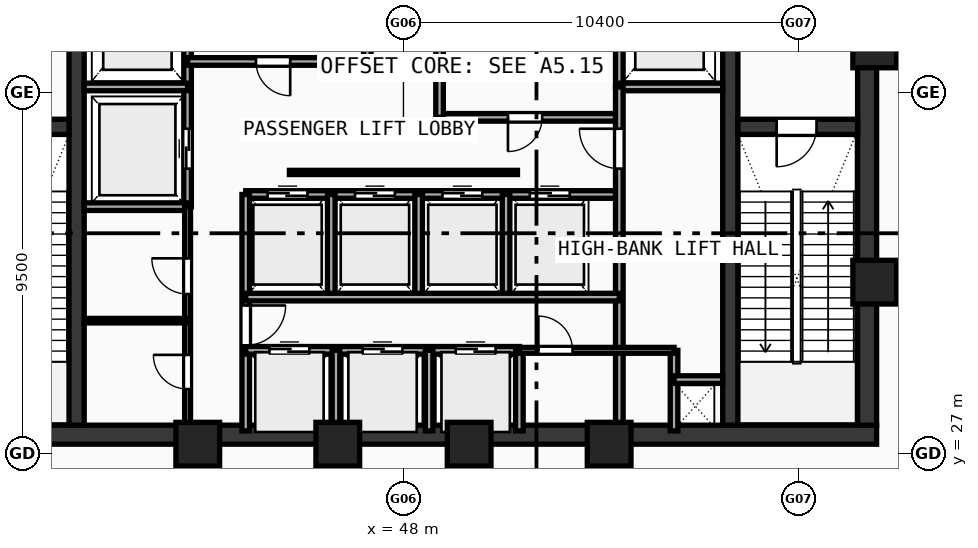
"""IFC4 building model, lengths in metres.
Left out: names, types, materials, properties, quantities, classifications, styles, units other than length and angle.
Written with IfcOpenShell. Run it as: python <this file> out.ifc"""

import sys

from ifc_helpers import new_model, si_unit, direction, frame, frame_2d, origin, origin_with_axes, origin_2d, place, context, subcontext, project, spatial, rectangle, hollow_rectangle, extrude, source, transform, mapped, element, fill, save


model = new_model("IFC4")
c1 = context("Model", 3, precision=1e-05, world=origin(), true_north=direction((0.0, 1.0)))
c2 = subcontext(c1, "Body", "Model", "MODEL_VIEW")
j1 = project(units=[si_unit("LENGTHUNIT", "METRE"), si_unit("PLANEANGLEUNIT", "RADIAN")], contexts=[c1])
p1 = place(None, origin())
s1 = spatial("IfcSite", under=j1, at=p1, CompositionType="ELEMENT")
p2 = place(p1, origin())
s2 = spatial("IfcBuilding", under=s1, at=p2, CompositionType="ELEMENT")
p3 = place(p2, frame((0.0, 0.0, 218.96)))
s3 = spatial("IfcBuildingStorey", under=s2, at=p3, CompositionType="ELEMENT", Elevation=218.96)
p4 = place(p3, frame((35.55, 27.5, 0.0), z_axis=(0.0, 0.0, 1.0), x_axis=(1.0, 0.0, 0.0)))
e1 = element("IfcWall", 1, at=p4, inside=s3, PredefinedType="SHEAR", context=c2, shape_type="SweptSolid", body=[
    extrude(rectangle(XDim=24.9, YDim=0.5, at=frame_2d((12.45, 0.0))), origin(), (0.0, 0.0, 1.0), 5.57),
])
p5 = place(p3, frame((60.2, 27.75, 0.0), z_axis=(0.0, 0.0, 1.0), x_axis=(0.0, 1.0, 0.0)))
e2 = element("IfcWall", 2, at=p5, inside=s3, PredefinedType="SHEAR", context=c2, shape_type="SweptSolid", body=[
    extrude(rectangle(XDim=12.2, YDim=0.5, at=frame_2d((6.1, 0.0))), origin(), (0.0, 0.0, 1.0), 5.57),
])
p6 = place(p3, frame((39.4, 27.75, 0.0), z_axis=(0.0, 0.0, 1.0), x_axis=(0.0, 1.0, 0.0)))
e3 = element("IfcWall", 3, at=p6, inside=s3, PredefinedType="SHEAR", context=c2, shape_type="SweptSolid", body=[
    extrude(rectangle(XDim=12.2, YDim=0.4, at=frame_2d((6.1, 0.0))), origin(), (0.0, 0.0, 1.0), 5.57),
])
p7 = place(p6, frame((10.0, 0.0, 0.0)))
e4 = element("IfcOpeningElement", 4, at=p7, cuts=e3, PredefinedType="OPENING", context=c2, shape_type="SweptSolid", body=[
    extrude(rectangle(XDim=1.1, YDim=2.1, at=frame_2d((0.55, 1.05))), frame((0.0, 0.21, 0.0), z_axis=(0.0, -1.0, 0.0), x_axis=(1.0, 0.0, 0.0)), (0.0, 0.0, 1.0), 0.42),
])
p8 = place(p3, frame((56.6, 27.75, 0.0), z_axis=(0.0, 0.0, 1.0), x_axis=(0.0, 1.0, 0.0)))
e5 = element("IfcWall", 5, at=p8, inside=s3, PredefinedType="SHEAR", context=c2, shape_type="SweptSolid", body=[
    extrude(rectangle(XDim=12.2, YDim=0.4, at=frame_2d((6.1, 0.0))), origin(), (0.0, 0.0, 1.0), 5.57),
])
p9 = place(p8, frame((10.0, 0.0, 0.0)))
e6 = element("IfcOpeningElement", 6, at=p9, cuts=e5, PredefinedType="OPENING", context=c2, shape_type="SweptSolid", body=[
    extrude(rectangle(XDim=1.1, YDim=2.1, at=frame_2d((0.55, 1.05))), frame((0.0, 0.21, 0.0), z_axis=(0.0, -1.0, 0.0), x_axis=(1.0, 0.0, 0.0)), (0.0, 0.0, 1.0), 0.42),
])
p10 = place(p3, frame((36.05, 35.6, 0.0), z_axis=(0.0, 0.0, 1.0), x_axis=(1.0, 0.0, 0.0)))
e7 = element("IfcWall", 7, at=p10, inside=s3, PredefinedType="SHEAR", context=c2, shape_type="SweptSolid", body=[
    extrude(rectangle(XDim=3.15, YDim=0.4, at=frame_2d((1.575, 0.0))), origin(), (0.0, 0.0, 1.0), 5.57),
])
p11 = place(p10, frame((1.07, 0.0, 0.0)))
e8 = element("IfcOpeningElement", 8, at=p11, cuts=e7, PredefinedType="OPENING", context=c2, shape_type="SweptSolid", body=[
    extrude(rectangle(XDim=1.05, YDim=2.1, at=frame_2d((0.525, 1.05))), frame((0.0, 0.21, 0.0), z_axis=(0.0, -1.0, 0.0), x_axis=(1.0, 0.0, 0.0)), (0.0, 0.0, 1.0), 0.42),
])
p12 = place(p3, frame((56.8, 35.6, 0.0), z_axis=(0.0, 0.0, 1.0), x_axis=(1.0, 0.0, 0.0)))
e9 = element("IfcWall", 9, at=p12, inside=s3, PredefinedType="SHEAR", context=c2, shape_type="SweptSolid", body=[
    extrude(rectangle(XDim=3.15, YDim=0.4, at=frame_2d((1.575, 0.0))), origin(), (0.0, 0.0, 1.0), 5.57),
])
p13 = place(p12, frame((1.02, 0.0, 0.0)))
e10 = element("IfcOpeningElement", 10, at=p13, cuts=e9, PredefinedType="OPENING", context=c2, shape_type="SweptSolid", body=[
    extrude(rectangle(XDim=1.05, YDim=2.1, at=frame_2d((0.525, 1.05))), frame((0.0, 0.21, 0.0), z_axis=(0.0, -1.0, 0.0), x_axis=(1.0, 0.0, 0.0)), (0.0, 0.0, 1.0), 0.42),
])
m1 = source(origin(), c2, "Body", "SweptSolid", [
    extrude(hollow_rectangle(XDim=1.15, YDim=1.15, WallThickness=0.048, at=origin_2d()), origin(), (0.0, 0.0, 1.0), 5.85),
])
for number, where, z_axis, x_axis in (
    (11, (42.588, 27.25, -0.28), (0.0, 0.0, 1.0), (1.0, 0.0, 0.0)),
    (12, (46.272, 27.25, -0.28), (0.0, 0.0, 1.0), (1.0, 0.0, 0.0)),
    (13, (49.729, 27.25, -0.28), (0.0, 0.0, 1.0), (1.0, 0.0, 0.0)),
    (14, (53.412, 27.25, -0.28), (0.0, 0.0, 1.0), (1.0, 0.0, 0.0)),
    (15, (60.4, 31.513, -0.28), (0.0, 0.0, 1.0), (1.0, 0.0, 0.0)),
    (16, (60.4, 37.729, -0.28), (0.0, 0.0, 1.0), (1.0, 0.0, 0.0)),
):
    element("IfcColumn", number, at=place(p3, frame(where, z_axis=z_axis, x_axis=x_axis)), inside=s3, PredefinedType="COLUMN", context=c2, shape_type="MappedRepresentation", body=[
        mapped(m1, transform((0.0, 0.0, 0.0), scale=1.0)),
    ])
p14 = place(p3, frame((42.32, 33.5, 0.0), z_axis=(0.0, 0.0, 1.0), x_axis=(0.0, 1.0, 0.0)))
e17 = element("IfcWall", 17, at=p14, inside=s3, PredefinedType="SOLIDWALL", context=c2, shape_type="SweptSolid", body=[
    extrude(rectangle(XDim=6.45, YDim=0.2, at=frame_2d((3.225, 0.0))), origin(), (0.0, 0.0, 1.0), 5.57),
])
p15 = place(p14, frame((1.0, 0.0, 0.0)))
e18 = element("IfcOpeningElement", 18, at=p15, cuts=e17, PredefinedType="OPENING", context=c2, shape_type="SweptSolid", body=[
    extrude(rectangle(XDim=1.05, YDim=2.1, at=frame_2d((0.525, 1.05))), frame((0.0, 0.11, 0.0), z_axis=(0.0, -1.0, 0.0), x_axis=(1.0, 0.0, 0.0)), (0.0, 0.0, 1.0), 0.22),
])
for number, where, z_axis, x_axis in (
    (19, (39.6, 36.65, 0.0), (0.0, 0.0, 1.0), (1.0, 0.0, 0.0)),
    (20, (39.6, 33.5, 0.0), (0.0, 0.0, 1.0), (1.0, 0.0, 0.0)),
):
    element("IfcWall", number, at=place(p3, frame(where, z_axis=z_axis, x_axis=x_axis)), inside=s3, PredefinedType="SOLIDWALL", context=c2, shape_type="SweptSolid", body=[
        extrude(rectangle(XDim=2.72, YDim=0.2, at=frame_2d((1.36, 0.0))), origin(), (0.0, 0.0, 1.0), 5.57),
    ])
p16 = place(p3, frame((53.68, 36.65, 0.0), z_axis=(0.0, 0.0, 1.0), x_axis=(0.0, 1.0, 0.0)))
e21 = element("IfcWall", 21, at=p16, inside=s3, PredefinedType="SOLIDWALL", context=c2, shape_type="SweptSolid", body=[
    extrude(rectangle(XDim=3.3, YDim=0.2, at=frame_2d((1.65, 0.0))), origin(), (0.0, 0.0, 1.0), 5.57),
])
p17 = place(p3, frame((53.68, 36.65, 0.0), z_axis=(0.0, 0.0, 1.0), x_axis=(1.0, 0.0, 0.0)))
e22 = element("IfcWall", 22, at=p17, inside=s3, PredefinedType="SOLIDWALL", context=c2, shape_type="SweptSolid", body=[
    extrude(rectangle(XDim=2.72, YDim=0.2, at=frame_2d((1.36, 0.0))), origin(), (0.0, 0.0, 1.0), 5.57),
])
p18 = place(p3, frame((42.32, 37.32, 0.0), z_axis=(0.0, 0.0, 1.0), x_axis=(1.0, 0.0, 0.0)))
e23 = element("IfcWall", 23, at=p18, inside=s3, PredefinedType="SOLIDWALL", context=c2, shape_type="SweptSolid", body=[
    extrude(rectangle(XDim=4.73, YDim=0.2, at=frame_2d((2.365, 0.0))), origin(), (0.0, 0.0, 1.0), 5.57),
])
p19 = place(p18, frame((1.8, 0.0, 0.0)))
e24 = element("IfcOpeningElement", 24, at=p19, cuts=e23, PredefinedType="OPENING", context=c2, shape_type="SweptSolid", body=[
    extrude(rectangle(XDim=0.9, YDim=2.1, at=frame_2d((0.45, 1.05))), frame((0.0, 0.11, 0.0), z_axis=(0.0, -1.0, 0.0), x_axis=(1.0, 0.0, 0.0)), (0.0, 0.0, 1.0), 0.22),
])
p20 = place(p3, frame((48.95, 35.85, 0.0), z_axis=(0.0, 0.0, 1.0), x_axis=(1.0, 0.0, 0.0)))
e25 = element("IfcWall", 25, at=p20, inside=s3, PredefinedType="SOLIDWALL", context=c2, shape_type="SweptSolid", body=[
    extrude(rectangle(XDim=4.73, YDim=0.2, at=frame_2d((2.365, 0.0))), origin(), (0.0, 0.0, 1.0), 5.57),
])
p21 = place(p20, frame((1.8, 0.0, 0.0)))
e26 = element("IfcOpeningElement", 26, at=p21, cuts=e25, PredefinedType="OPENING", context=c2, shape_type="SweptSolid", body=[
    extrude(rectangle(XDim=0.9, YDim=2.1, at=frame_2d((0.45, 1.05))), frame((0.0, 0.11, 0.0), z_axis=(0.0, -1.0, 0.0), x_axis=(1.0, 0.0, 0.0)), (0.0, 0.0, 1.0), 0.22),
])
p22 = place(p3, frame((47.05, 37.32, 0.0), z_axis=(0.0, 0.0, 1.0), x_axis=(0.0, 1.0, 0.0)))
e27 = element("IfcWall", 27, at=p22, inside=s3, PredefinedType="SOLIDWALL", context=c2, shape_type="SweptSolid", body=[
    extrude(rectangle(XDim=2.63, YDim=0.2, at=frame_2d((1.315, 0.0))), origin(), (0.0, 0.0, 1.0), 5.57),
])
p23 = place(p3, frame((48.95, 35.85, 0.0), z_axis=(0.0, 0.0, 1.0), x_axis=(0.0, 1.0, 0.0)))
e28 = element("IfcWall", 28, at=p23, inside=s3, PredefinedType="SOLIDWALL", context=c2, shape_type="SweptSolid", body=[
    extrude(rectangle(XDim=4.1, YDim=0.2, at=frame_2d((2.05, 0.0))), origin(), (0.0, 0.0, 1.0), 5.57),
])
p24 = place(p3, frame((43.85, 33.82, 0.0), z_axis=(0.0, 0.0, 1.0), x_axis=(1.0, 0.0, 0.0)))
e29 = element("IfcWall", 29, at=p24, inside=s3, PredefinedType="SOLIDWALL", context=c2, shape_type="SweptSolid", body=[
    extrude(rectangle(XDim=9.83, YDim=0.2, at=frame_2d((4.915, 0.0))), origin(), (0.0, 0.0, 1.0), 5.57),
])
p25 = place(p24, frame((0.575, 0.0, 0.0)))
e30 = element("IfcOpeningElement", 30, at=p25, cuts=e29, PredefinedType="OPENING", context=c2, shape_type="SweptSolid", body=[
    extrude(rectangle(XDim=1.05, YDim=2.1, at=frame_2d((0.525, 1.05))), frame((0.0, 0.11, 0.0), z_axis=(0.0, -1.0, 0.0), x_axis=(1.0, 0.0, 0.0)), (0.0, 0.0, 1.0), 0.22),
])
p26 = place(p24, frame((2.875, 0.0, 0.0)))
e31 = element("IfcOpeningElement", 31, at=p26, cuts=e29, PredefinedType="OPENING", context=c2, shape_type="SweptSolid", body=[
    extrude(rectangle(XDim=1.05, YDim=2.1, at=frame_2d((0.525, 1.05))), frame((0.0, 0.11, 0.0), z_axis=(0.0, -1.0, 0.0), x_axis=(1.0, 0.0, 0.0)), (0.0, 0.0, 1.0), 0.22),
])
p27 = place(p24, frame((5.175, 0.0, 0.0)))
e32 = element("IfcOpeningElement", 32, at=p27, cuts=e29, PredefinedType="OPENING", context=c2, shape_type="SweptSolid", body=[
    extrude(rectangle(XDim=1.05, YDim=2.1, at=frame_2d((0.525, 1.05))), frame((0.0, 0.11, 0.0), z_axis=(0.0, -1.0, 0.0), x_axis=(1.0, 0.0, 0.0)), (0.0, 0.0, 1.0), 0.22),
])
p28 = place(p24, frame((7.475, 0.0, 0.0)))
e33 = element("IfcOpeningElement", 33, at=p28, cuts=e29, PredefinedType="OPENING", context=c2, shape_type="SweptSolid", body=[
    extrude(rectangle(XDim=1.05, YDim=2.1, at=frame_2d((0.525, 1.05))), frame((0.0, 0.11, 0.0), z_axis=(0.0, -1.0, 0.0), x_axis=(1.0, 0.0, 0.0)), (0.0, 0.0, 1.0), 0.22),
])
p29 = place(p3, frame((43.85, 27.6, 0.0), z_axis=(0.0, 0.0, 1.0), x_axis=(0.0, 1.0, 0.0)))
e34 = element("IfcWall", 34, at=p29, inside=s3, PredefinedType="SOLIDWALL", context=c2, shape_type="SweptSolid", body=[
    extrude(rectangle(XDim=6.22, YDim=0.2, at=frame_2d((3.11, 0.0))), origin(), (0.0, 0.0, 1.0), 5.57),
])
p30 = place(p29, frame((2.25, 0.0, 0.0)))
e35 = element("IfcOpeningElement", 35, at=p30, cuts=e34, PredefinedType="OPENING", context=c2, shape_type="SweptSolid", body=[
    extrude(rectangle(XDim=1.05, YDim=2.1, at=frame_2d((0.525, 1.05))), frame((0.0, 0.11, 0.0), z_axis=(0.0, -1.0, 0.0), x_axis=(1.0, 0.0, 0.0)), (0.0, 0.0, 1.0), 0.22),
])
p31 = place(p3, frame((53.68, 27.6, 0.0), z_axis=(0.0, 0.0, 1.0), x_axis=(0.0, 1.0, 0.0)))
e36 = element("IfcWall", 36, at=p31, inside=s3, PredefinedType="SOLIDWALL", context=c2, shape_type="SweptSolid", body=[
    extrude(rectangle(XDim=9.05, YDim=0.2, at=frame_2d((4.525, 0.0))), origin(), (0.0, 0.0, 1.0), 2.22),
])
p32 = place(p31, frame((6.9, 0.0, 0.0)))
e37 = element("IfcOpeningElement", 37, at=p32, cuts=e36, PredefinedType="OPENING", context=c2, shape_type="SweptSolid", body=[
    extrude(rectangle(XDim=1.05, YDim=2.1, at=frame_2d((0.525, 1.05))), frame((0.0, 0.11, 0.0), z_axis=(0.0, -1.0, 0.0), x_axis=(1.0, 0.0, 0.0)), (0.0, 0.0, 1.0), 0.22),
])
for number, where, z_axis, x_axis in (
    (38, (46.1, 31.12, 0.0), (0.0, 0.0, 1.0), (0.0, 1.0, 0.0)),
    (39, (48.4, 31.12, 0.0), (0.0, 0.0, 1.0), (0.0, 1.0, 0.0)),
    (40, (50.7, 31.12, 0.0), (0.0, 0.0, 1.0), (0.0, 1.0, 0.0)),
):
    element("IfcWall", number, at=place(p3, frame(where, z_axis=z_axis, x_axis=x_axis)), inside=s3, PredefinedType="SOLIDWALL", context=c2, shape_type="SweptSolid", body=[
        extrude(rectangle(XDim=2.7, YDim=0.2, at=frame_2d((1.35, 0.0))), origin(), (0.0, 0.0, 1.0), 5.57),
    ])
p33 = place(p3, frame((43.85, 29.72, 0.0), z_axis=(0.0, 0.0, 1.0), x_axis=(1.0, 0.0, 0.0)))
e41 = element("IfcWall", 41, at=p33, inside=s3, PredefinedType="SOLIDWALL", context=c2, shape_type="SweptSolid", body=[
    extrude(rectangle(XDim=7.2, YDim=0.2, at=frame_2d((3.6, 0.0))), origin(), (0.0, 0.0, 1.0), 5.57),
])
p34 = place(p33, frame((0.625, 0.0, 0.0)))
e42 = element("IfcOpeningElement", 42, at=p34, cuts=e41, PredefinedType="OPENING", context=c2, shape_type="SweptSolid", body=[
    extrude(rectangle(XDim=1.05, YDim=2.1, at=frame_2d((0.525, 1.05))), frame((0.0, 0.11, 0.0), z_axis=(0.0, -1.0, 0.0), x_axis=(1.0, 0.0, 0.0)), (0.0, 0.0, 1.0), 0.22),
])
p35 = place(p33, frame((3.075, 0.0, 0.0)))
e43 = element("IfcOpeningElement", 43, at=p35, cuts=e41, PredefinedType="OPENING", context=c2, shape_type="SweptSolid", body=[
    extrude(rectangle(XDim=1.05, YDim=2.1, at=frame_2d((0.525, 1.05))), frame((0.0, 0.11, 0.0), z_axis=(0.0, -1.0, 0.0), x_axis=(1.0, 0.0, 0.0)), (0.0, 0.0, 1.0), 0.22),
])
p36 = place(p33, frame((5.525, 0.0, 0.0)))
e44 = element("IfcOpeningElement", 44, at=p36, cuts=e41, PredefinedType="OPENING", context=c2, shape_type="SweptSolid", body=[
    extrude(rectangle(XDim=1.05, YDim=2.1, at=frame_2d((0.525, 1.05))), frame((0.0, 0.11, 0.0), z_axis=(0.0, -1.0, 0.0), x_axis=(1.0, 0.0, 0.0)), (0.0, 0.0, 1.0), 0.22),
])
p37 = place(p3, frame((51.05, 27.6, 0.0), z_axis=(0.0, 0.0, 1.0), x_axis=(0.0, 1.0, 0.0)))
e45 = element("IfcWall", 45, at=p37, inside=s3, PredefinedType="SOLIDWALL", context=c2, shape_type="SweptSolid", body=[
    extrude(rectangle(XDim=2.12, YDim=0.2, at=frame_2d((1.06, 0.0))), origin(), (0.0, 0.0, 1.0), 5.57),
])
p38 = place(p3, frame((43.85, 31.12, 0.0), z_axis=(0.0, 0.0, 1.0), x_axis=(1.0, 0.0, 0.0)))
e46 = element("IfcWall", 46, at=p38, inside=s3, PredefinedType="SOLIDWALL", context=c2, shape_type="SweptSolid", body=[
    extrude(rectangle(XDim=9.83, YDim=0.2, at=frame_2d((4.915, 0.0))), origin(), (0.0, 0.0, 1.0), 5.57),
])
p39 = place(p3, frame((46.225, 27.6, 0.0), z_axis=(0.0, 0.0, 1.0), x_axis=(0.0, 1.0, 0.0)))
e47 = element("IfcWall", 47, at=p39, inside=s3, PredefinedType="SOLIDWALL", context=c2, shape_type="SweptSolid", body=[
    extrude(rectangle(XDim=2.12, YDim=0.2, at=frame_2d((1.06, 0.0))), origin(), (0.0, 0.0, 1.0), 2.22),
])
for number, where, z_axis, x_axis in (
    (48, (48.675, 27.6, 0.0), (0.0, 0.0, 1.0), (0.0, 1.0, 0.0)),
    (49, (55.12, 27.6, 0.0), (0.0, 0.0, 1.0), (0.0, 1.0, 0.0)),
):
    element("IfcWall", number, at=place(p3, frame(where, z_axis=z_axis, x_axis=x_axis)), inside=s3, PredefinedType="SOLIDWALL", context=c2, shape_type="SweptSolid", body=[
        extrude(rectangle(XDim=2.12, YDim=0.2, at=frame_2d((1.06, 0.0))), origin(), (0.0, 0.0, 1.0), 5.57),
    ])
p40 = place(p3, frame((55.12, 28.95, 0.0), z_axis=(0.0, 0.0, 1.0), x_axis=(1.0, 0.0, 0.0)))
e50 = element("IfcWall", 50, at=p40, inside=s3, PredefinedType="SOLIDWALL", context=c2, shape_type="SweptSolid", body=[
    extrude(rectangle(XDim=1.28, YDim=0.2, at=frame_2d((0.64, 0.0))), origin(), (0.0, 0.0, 1.0), 5.57),
])
p41 = place(p3, frame((42.32, 27.6, 0.0), z_axis=(0.0, 0.0, 1.0), x_axis=(0.0, 1.0, 0.0)))
e51 = element("IfcWall", 51, at=p41, inside=s3, PredefinedType="PARTITIONING", context=c2, shape_type="SweptSolid", body=[
    extrude(rectangle(XDim=5.9, YDim=0.155, at=frame_2d((2.95, 0.0))), origin(), (0.0, 0.0, 1.0), 2.22),
])
p42 = place(p41, frame((1.1, 0.0, 0.0)))
e52 = element("IfcOpeningElement", 52, at=p42, cuts=e51, PredefinedType="OPENING", context=c2, shape_type="SweptSolid", body=[
    extrude(rectangle(XDim=0.9, YDim=2.1, at=frame_2d((0.45, 1.05))), frame((0.0, 0.087, 0.0), z_axis=(0.0, -1.0, 0.0), x_axis=(1.0, 0.0, 0.0)), (0.0, 0.0, 1.0), 0.175),
])
p43 = place(p41, frame((3.6, 0.0, 0.0)))
e53 = element("IfcOpeningElement", 53, at=p43, cuts=e51, PredefinedType="OPENING", context=c2, shape_type="SweptSolid", body=[
    extrude(rectangle(XDim=0.94, YDim=2.1, at=frame_2d((0.47, 1.05))), frame((0.0, 0.087, 0.0), z_axis=(0.0, -1.0, 0.0), x_axis=(1.0, 0.0, 0.0)), (0.0, 0.0, 1.0), 0.175),
])
p44 = place(p3, frame((51.05, 29.72, 0.0), z_axis=(0.0, 0.0, 1.0), x_axis=(1.0, 0.0, 0.0)))
e54 = element("IfcWall", 54, at=p44, inside=s3, PredefinedType="PARTITIONING", context=c2, shape_type="SweptSolid", body=[
    extrude(rectangle(XDim=4.07, YDim=0.155, at=frame_2d((2.035, 0.0))), origin(), (0.0, 0.0, 1.0), 5.57),
])
p45 = place(p44, frame((0.5, 0.0, 0.0)))
e55 = element("IfcOpeningElement", 55, at=p45, cuts=e54, PredefinedType="OPENING", context=c2, shape_type="SweptSolid", body=[
    extrude(rectangle(XDim=0.9, YDim=2.1, at=frame_2d((0.45, 1.05))), frame((0.0, 0.087, 0.0), z_axis=(0.0, -1.0, 0.0), x_axis=(1.0, 0.0, 0.0)), (0.0, 0.0, 1.0), 0.175),
])
p46 = place(p3, frame((39.6, 30.5, 0.0), z_axis=(0.0, 0.0, 1.0), x_axis=(1.0, 0.0, 0.0)))
e56 = element("IfcWall", 56, at=p46, inside=s3, PredefinedType="PARTITIONING", context=c2, shape_type="SweptSolid", body=[
    extrude(rectangle(XDim=2.72, YDim=0.12, at=frame_2d((1.36, 0.0))), origin(), (0.0, 0.0, 1.0), 5.57),
])
p47 = place(p3, frame((45.0, 34.4, 0.0), z_axis=(0.0, 0.0, 1.0), x_axis=(1.0, 0.0, 0.0)))
e57 = element("IfcWall", 57, at=p47, inside=s3, PredefinedType="MOVABLE", context=c2, shape_type="SweptSolid", body=[
    extrude(rectangle(XDim=6.0, YDim=0.11, at=frame_2d((3.0, 0.0))), origin(), (0.0, 0.0, 1.0), 2.5),
])
m2 = source(origin(), c2, "Body", "SweptSolid", [
    extrude(rectangle(XDim=1.05, YDim=2.1, at=frame_2d((0.525, 1.05))), frame((0.0, 0.025, 0.0), z_axis=(0.0, -1.0, 0.0), x_axis=(1.0, 0.0, 0.0)), (0.0, 0.0, 1.0), 0.05),
])
p48 = place(p13, frame((1.05, 0.0, 0.0), z_axis=(0.0, 0.0, 1.0), x_axis=(-1.0, 0.0, 0.0)))
e58 = element("IfcDoor", 58, at=p48, inside=s3, OperationType="SINGLE_SWING_RIGHT", PredefinedType="DOOR", context=c2, shape_type="MappedRepresentation", body=[
    mapped(m2, transform((0.0, 0.0, 0.0), scale=1.0)),
])
fill(e10, e58)
p49 = place(p15, origin_with_axes())
e59 = element("IfcDoor", 59, at=p49, inside=s3, OperationType="DOUBLE_DOOR_SLIDING", PredefinedType="DOOR", context=c2, shape_type="MappedRepresentation", body=[
    mapped(m2, transform((0.0, 0.0, 0.0), scale=1.0)),
])
fill(e18, e59)
m3 = source(origin(), c2, "Body", "SweptSolid", [
    extrude(rectangle(XDim=0.9, YDim=2.1, at=frame_2d((0.45, 1.05))), frame((0.0, 0.025, 0.0), z_axis=(0.0, -1.0, 0.0), x_axis=(1.0, 0.0, 0.0)), (0.0, 0.0, 1.0), 0.05),
])
p50 = place(p19, frame((0.9, 0.0, 0.0), z_axis=(0.0, 0.0, 1.0), x_axis=(-1.0, 0.0, 0.0)))
e60 = element("IfcDoor", 60, at=p50, inside=s3, OperationType="SINGLE_SWING_LEFT", PredefinedType="DOOR", context=c2, shape_type="MappedRepresentation", body=[
    mapped(m3, transform((0.0, 0.0, 0.0), scale=1.0)),
])
fill(e24, e60)
p51 = place(p21, frame((0.9, 0.0, 0.0), z_axis=(0.0, 0.0, 1.0), x_axis=(-1.0, 0.0, 0.0)))
e61 = element("IfcDoor", 61, at=p51, inside=s3, OperationType="SINGLE_SWING_RIGHT", PredefinedType="DOOR", context=c2, shape_type="MappedRepresentation", body=[
    mapped(m3, transform((0.0, 0.0, 0.0), scale=1.0)),
])
fill(e26, e61)
p52 = place(p25, origin_with_axes())
e62 = element("IfcDoor", 62, at=p52, inside=s3, OperationType="DOUBLE_DOOR_SLIDING", PredefinedType="DOOR", context=c2, shape_type="MappedRepresentation", body=[
    mapped(m2, transform((0.0, 0.0, 0.0), scale=1.0)),
])
fill(e30, e62)
p53 = place(p26, origin_with_axes())
e63 = element("IfcDoor", 63, at=p53, inside=s3, OperationType="DOUBLE_DOOR_SLIDING", PredefinedType="DOOR", context=c2, shape_type="MappedRepresentation", body=[
    mapped(m2, transform((0.0, 0.0, 0.0), scale=1.0)),
])
fill(e31, e63)
p54 = place(p27, origin_with_axes())
e64 = element("IfcDoor", 64, at=p54, inside=s3, OperationType="DOUBLE_DOOR_SLIDING", PredefinedType="DOOR", context=c2, shape_type="MappedRepresentation", body=[
    mapped(m2, transform((0.0, 0.0, 0.0), scale=1.0)),
])
fill(e32, e64)
p55 = place(p28, origin_with_axes())
e65 = element("IfcDoor", 65, at=p55, inside=s3, OperationType="DOUBLE_DOOR_SLIDING", PredefinedType="DOOR", context=c2, shape_type="MappedRepresentation", body=[
    mapped(m2, transform((0.0, 0.0, 0.0), scale=1.0)),
])
fill(e33, e65)
p56 = place(p30, frame((1.05, 0.0, 0.0), z_axis=(0.0, 0.0, 1.0), x_axis=(-1.0, 0.0, 0.0)))
e66 = element("IfcDoor", 66, at=p56, inside=s3, OperationType="SINGLE_SWING_LEFT", PredefinedType="DOOR", context=c2, shape_type="MappedRepresentation", body=[
    mapped(m2, transform((0.0, 0.0, 0.0), scale=1.0)),
])
fill(e35, e66)
p57 = place(p32, origin_with_axes())
e67 = element("IfcDoor", 67, at=p57, inside=s3, OperationType="SINGLE_SWING_RIGHT", PredefinedType="DOOR", context=c2, shape_type="MappedRepresentation", body=[
    mapped(m2, transform((0.0, 0.0, 0.0), scale=1.0)),
])
fill(e37, e67)
p58 = place(p34, origin_with_axes())
e68 = element("IfcDoor", 68, at=p58, inside=s3, OperationType="DOUBLE_DOOR_SLIDING", PredefinedType="DOOR", context=c2, shape_type="MappedRepresentation", body=[
    mapped(m2, transform((0.0, 0.0, 0.0), scale=1.0)),
])
fill(e42, e68)
p59 = place(p35, origin_with_axes())
e69 = element("IfcDoor", 69, at=p59, inside=s3, OperationType="DOUBLE_DOOR_SLIDING", PredefinedType="DOOR", context=c2, shape_type="MappedRepresentation", body=[
    mapped(m2, transform((0.0, 0.0, 0.0), scale=1.0)),
])
fill(e43, e69)
p60 = place(p36, origin_with_axes())
e70 = element("IfcDoor", 70, at=p60, inside=s3, OperationType="DOUBLE_DOOR_SLIDING", PredefinedType="DOOR", context=c2, shape_type="MappedRepresentation", body=[
    mapped(m2, transform((0.0, 0.0, 0.0), scale=1.0)),
])
fill(e44, e70)
p61 = place(p42, origin_with_axes())
e71 = element("IfcDoor", 71, at=p61, inside=s3, OperationType="SINGLE_SWING_RIGHT", PredefinedType="DOOR", context=c2, shape_type="MappedRepresentation", body=[
    mapped(m3, transform((0.0, 0.0, 0.0), scale=1.0)),
])
fill(e52, e71)
m4 = source(origin(), c2, "Body", "SweptSolid", [
    extrude(rectangle(XDim=0.94, YDim=2.1, at=frame_2d((0.47, 1.05))), frame((0.0, 0.025, 0.0), z_axis=(0.0, -1.0, 0.0), x_axis=(1.0, 0.0, 0.0)), (0.0, 0.0, 1.0), 0.05),
])
p62 = place(p43, origin_with_axes())
e72 = element("IfcDoor", 72, at=p62, inside=s3, OperationType="SINGLE_SWING_RIGHT", PredefinedType="DOOR", context=c2, shape_type="MappedRepresentation", body=[
    mapped(m4, transform((0.0, 0.0, 0.0), scale=1.0)),
])
fill(e53, e72)
p63 = place(p45, origin_with_axes())
e73 = element("IfcDoor", 73, at=p63, inside=s3, OperationType="SINGLE_SWING_LEFT", PredefinedType="DOOR", context=c2, shape_type="MappedRepresentation", body=[
    mapped(m3, transform((0.0, 0.0, 0.0), scale=1.0)),
])
fill(e55, e73)
save(model, sys.argv[1])
